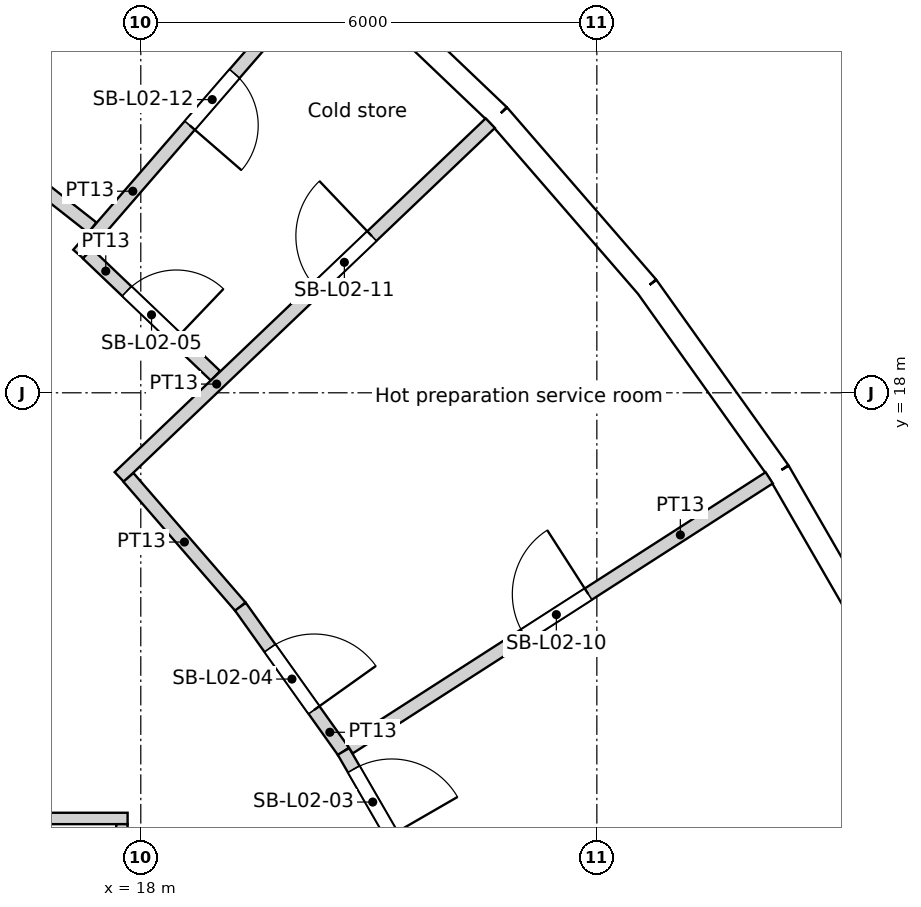
"""IFC4 building model, lengths in metres.
Left out: names, types, materials, properties, quantities, classifications, styles, units other than length and angle.
Written with IfcOpenShell. Run it as: python <this file> out.ifc"""

import sys

from ifc_helpers import new_model, si_unit, direction, frame, frame_2d, origin, origin_2d, place, context, subcontext, project, spatial, rectangle, circle, extrude, element, fill, save


model = new_model("IFC4")
c1 = context("Model", 3, precision=1e-05, world=origin(), true_north=direction((0.0, 1.0)))
c2 = subcontext(c1, "Body", "Model", "MODEL_VIEW")
j1 = project(units=[si_unit("LENGTHUNIT", "METRE"), si_unit("PLANEANGLEUNIT", "RADIAN")], contexts=[c1])
p1 = place(None, origin())
s1 = spatial("IfcSite", under=j1, at=p1, CompositionType="ELEMENT")
p2 = place(p1, origin())
s2 = spatial("IfcBuilding", under=s1, at=p2, CompositionType="ELEMENT")
p3 = place(p2, frame((0.0, 0.0, 13.8)))
s3 = spatial("IfcBuildingStorey", under=s2, at=p3, CompositionType="ELEMENT", Elevation=13.8)
for number, where, z_axis, x_axis in (
    (1, (25.469, 16.368, 0.0), (0.0, 0.0, 1.0), (1.0, 0.0, 0.0)),
    (2, (21.911, 20.892, 0.0), (0.0, 0.0, 1.0), (1.0, 0.0, 0.0)),
):
    element("IfcColumn", number, at=place(p3, frame(where, z_axis=z_axis, x_axis=x_axis)), inside=s3, PredefinedType="COLUMN", context=c2, shape_type="SweptSolid", body=[
        extrude(circle(Radius=0.7, at=origin_2d()), origin(), (0.0, 0.0, 1.0), 4.8),
    ])
p4 = place(p3, frame((18.805, 15.779, 0.0), z_axis=(0.0, 0.0, 1.0), x_axis=(1.0, 0.0, 0.0)))
e3 = element("IfcColumn", 3, at=p4, inside=s3, PredefinedType="COLUMN", context=c2, shape_type="SweptSolid", body=[
    extrude(circle(Radius=0.75, at=origin_2d()), origin(), (0.0, 0.0, 1.0), 4.8),
])
p5 = place(p3, frame((27.887, 14.377, 0.0), z_axis=(0.0, 0.0, 1.0), x_axis=(-0.500017373705, 0.866015372839, 0.0)))
e4 = element("IfcWall", 4, at=p5, inside=s3, PredefinedType="SOLIDWALL", context=c2, shape_type="SweptSolid", body=[
    extrude(rectangle(XDim=2.986, YDim=0.3, at=frame_2d((1.493, 0.0))), origin(), (0.0, 0.0, 1.0), 4.35),
])
p6 = place(p5, frame((1.493, 0.0, 2.0)))
e5 = element("IfcOpeningElement", 5, at=p6, cuts=e4, PredefinedType="OPENING", context=c2, shape_type="SweptSolid", body=[
    extrude(circle(Radius=1.2, at=origin_2d()), frame((0.0, 0.16, 0.0), z_axis=(0.0, -1.0, 0.0), x_axis=(1.0, 0.0, 0.0)), (0.0, 0.0, 1.0), 0.32),
])
p7 = place(p3, frame((26.394, 16.962, 0.0), z_axis=(0.0, 0.0, 1.0), x_axis=(-0.580100533892, 0.814544885551, 0.0)))
e6 = element("IfcWall", 6, at=p7, inside=s3, PredefinedType="SOLIDWALL", context=c2, shape_type="SweptSolid", body=[
    extrude(rectangle(XDim=2.986, YDim=0.3, at=frame_2d((1.493, 0.0))), origin(), (0.0, 0.0, 1.0), 4.35),
])
p8 = place(p7, frame((1.493, 0.0, 2.0)))
e7 = element("IfcOpeningElement", 7, at=p8, cuts=e6, PredefinedType="OPENING", context=c2, shape_type="SweptSolid", body=[
    extrude(circle(Radius=1.2, at=origin_2d()), frame((0.0, 0.16, 0.0), z_axis=(0.0, -1.0, 0.0), x_axis=(1.0, 0.0, 0.0)), (0.0, 0.0, 1.0), 0.32),
])
p9 = place(p3, frame((24.662, 19.394, 0.0), z_axis=(0.0, 0.0, 1.0), x_axis=(-0.654809121128, 0.755794294029, 0.0)))
e8 = element("IfcWall", 8, at=p9, inside=s3, PredefinedType="SOLIDWALL", context=c2, shape_type="SweptSolid", body=[
    extrude(rectangle(XDim=2.986, YDim=0.3, at=frame_2d((1.493, 0.0))), origin(), (0.0, 0.0, 1.0), 4.35),
])
p10 = place(p9, frame((1.493, 0.0, 2.0)))
e9 = element("IfcOpeningElement", 9, at=p10, cuts=e8, PredefinedType="OPENING", context=c2, shape_type="SweptSolid", body=[
    extrude(circle(Radius=1.2, at=origin_2d()), frame((0.0, 0.16, 0.0), z_axis=(0.0, -1.0, 0.0), x_axis=(1.0, 0.0, 0.0)), (0.0, 0.0, 1.0), 0.32),
])
p11 = place(p3, frame((22.707, 21.651, 0.0), z_axis=(0.0, 0.0, 1.0), x_axis=(-0.723750841228, 0.690061388444, 0.0)))
e10 = element("IfcWall", 10, at=p11, inside=s3, PredefinedType="SOLIDWALL", context=c2, shape_type="SweptSolid", body=[
    extrude(rectangle(XDim=2.986, YDim=0.3, at=frame_2d((1.493, 0.0))), origin(), (0.0, 0.0, 1.0), 4.35),
])
p12 = place(p11, frame((1.493, 0.0, 2.0)))
e11 = element("IfcOpeningElement", 11, at=p12, cuts=e10, PredefinedType="OPENING", context=c2, shape_type="SweptSolid", body=[
    extrude(circle(Radius=1.2, at=origin_2d()), frame((0.0, 0.16, 0.0), z_axis=(0.0, -1.0, 0.0), x_axis=(1.0, 0.0, 0.0)), (0.0, 0.0, 1.0), 0.32),
])
p13 = place(p3, frame((17.361, 20.173, 0.0), z_axis=(0.0, 0.0, 1.0), x_axis=(-0.786037421758, 0.618178915522, 0.0)))
e12 = element("IfcWall", 12, at=p13, inside=s3, PredefinedType="PARTITIONING", context=c2, shape_type="SweptSolid", body=[
    extrude(rectangle(XDim=2.443, YDim=0.175, at=frame_2d((1.222, 0.0))), origin(), (0.0, 0.0, 1.0), 3.75),
])
p14 = place(p3, frame((17.752, 8.328, 0.0), z_axis=(0.0, 0.0, 1.0), x_axis=(0.0, 1.0, 0.0)))
e13 = element("IfcWall", 13, at=p14, inside=s3, PredefinedType="PARTITIONING", context=c2, shape_type="SweptSolid", body=[
    extrude(rectangle(XDim=3.997, YDim=0.15, at=frame_2d((1.999, 0.0))), origin(), (0.0, 0.0, 1.0), 3.75),
])
p15 = place(p3, frame((-4.292, 12.4, 0.0), z_axis=(0.0, 0.0, 1.0), x_axis=(1.0, 0.0, 0.0)))
e14 = element("IfcWall", 14, at=p15, inside=s3, PredefinedType="PARTITIONING", context=c2, shape_type="SweptSolid", body=[
    extrude(rectangle(XDim=22.118, YDim=0.15, at=frame_2d((11.059, 0.0))), origin(), (0.0, 0.0, 1.0), 3.75),
])
p16 = place(p15, frame((12.196, 0.0, 0.0)))
e15 = element("IfcOpeningElement", 15, at=p16, cuts=e14, PredefinedType="OPENING", context=c2, shape_type="SweptSolid", body=[
    extrude(rectangle(XDim=1.2, YDim=2.4, at=frame_2d((0.6, 1.2))), frame((0.0, 0.075, 0.0), z_axis=(0.0, -1.0, 0.0), x_axis=(1.0, 0.0, 0.0)), (0.0, 0.0, 1.0), 0.15),
])
p17 = place(p15, frame((2.75, 0.0, 0.0)))
e16 = element("IfcOpeningElement", 16, at=p17, cuts=e14, PredefinedType="OPENING", context=c2, shape_type="SweptSolid", body=[
    extrude(rectangle(XDim=1.8, YDim=2.4, at=frame_2d((0.9, 1.2))), frame((0.0, 0.075, 0.0), z_axis=(0.0, -1.0, 0.0), x_axis=(1.0, 0.0, 0.0)), (0.0, 0.0, 1.0), 0.15),
])
p18 = place(p3, frame((17.298, 19.83, 0.0), z_axis=(0.0, 0.0, 1.0), x_axis=(0.723793587031, -0.69001655297, 0.0)))
e17 = element("IfcWall", 17, at=p18, inside=s3, PredefinedType="PARTITIONING", context=c2, shape_type="SweptSolid", body=[
    extrude(rectangle(XDim=2.327, YDim=0.175, at=frame_2d((1.164, 0.0))), origin(), (0.0, 0.0, 1.0), 3.75),
])
p19 = place(p18, frame((0.715, 0.0, 0.0)))
e18 = element("IfcOpeningElement", 18, at=p19, cuts=e17, PredefinedType="OPENING", context=c2, shape_type="SweptSolid", body=[
    extrude(rectangle(XDim=0.9, YDim=2.1, at=frame_2d((0.45, 1.05))), frame((0.0, 0.087, 0.0), z_axis=(0.0, -1.0, 0.0), x_axis=(1.0, 0.0, 0.0)), (0.0, 0.0, 1.0), 0.175),
])
p20 = place(p3, frame((19.311, 15.186, 0.0), z_axis=(0.0, 0.0, 1.0), x_axis=(-0.654802497225, 0.755800032831, 0.0)))
e19 = element("IfcWall", 19, at=p20, inside=s3, PredefinedType="PARTITIONING", context=c2, shape_type="SweptSolid", body=[
    extrude(rectangle(XDim=2.25, YDim=0.175, at=frame_2d((1.125, 0.0))), origin(), (0.0, 0.0, 1.0), 3.75),
])
p21 = place(p3, frame((17.178, 19.824, 0.0), z_axis=(0.0, 0.0, 1.0), x_axis=(0.654869105533, 0.755742320251, 0.0)))
e20 = element("IfcWall", 20, at=p21, inside=s3, PredefinedType="PARTITIONING", context=c2, shape_type="SweptSolid", body=[
    extrude(rectangle(XDim=4.993, YDim=0.175, at=frame_2d((2.497, 0.0))), origin(), (0.0, 0.0, 1.0), 3.75),
])
p22 = place(p21, frame((2.24, 0.0, 0.0)))
e21 = element("IfcOpeningElement", 21, at=p22, cuts=e20, PredefinedType="OPENING", context=c2, shape_type="SweptSolid", body=[
    extrude(rectangle(XDim=0.9, YDim=2.1, at=frame_2d((0.45, 1.05))), frame((0.0, 0.087, 0.0), z_axis=(0.0, -1.0, 0.0), x_axis=(1.0, 0.0, 0.0)), (0.0, 0.0, 1.0), 0.175),
])
p23 = place(p3, frame((19.311, 15.186, 0.0), z_axis=(0.0, 0.0, 1.0), x_axis=(0.580032319147, -0.814593462252, 0.0)))
e22 = element("IfcWall", 22, at=p23, inside=s3, PredefinedType="PARTITIONING", context=c2, shape_type="SweptSolid", body=[
    extrude(rectangle(XDim=2.338, YDim=0.175, at=frame_2d((1.169, 0.0))), origin(), (0.0, 0.0, 1.0), 3.75),
])
p24 = place(p23, frame((0.669, 0.0, 0.0)))
e23 = element("IfcOpeningElement", 23, at=p24, cuts=e22, PredefinedType="OPENING", context=c2, shape_type="SweptSolid", body=[
    extrude(rectangle(XDim=1.0, YDim=2.1, at=frame_2d((0.5, 1.05))), frame((0.0, 0.087, 0.0), z_axis=(0.0, -1.0, 0.0), x_axis=(1.0, 0.0, 0.0)), (0.0, 0.0, 1.0), 0.175),
])
p25 = place(p3, frame((20.667, 13.282, 0.0), z_axis=(0.0, 0.0, 1.0), x_axis=(0.500002679963, -0.866023856502, 0.0)))
e24 = element("IfcWall", 24, at=p25, inside=s3, PredefinedType="PARTITIONING", context=c2, shape_type="SweptSolid", body=[
    extrude(rectangle(XDim=2.338, YDim=0.175, at=frame_2d((1.169, 0.0))), origin(), (0.0, 0.0, 1.0), 3.75),
])
p26 = place(p25, frame((0.269, 0.0, 0.0)))
e25 = element("IfcOpeningElement", 25, at=p26, cuts=e24, PredefinedType="OPENING", context=c2, shape_type="SweptSolid", body=[
    extrude(rectangle(XDim=1.0, YDim=2.1, at=frame_2d((0.5, 1.05))), frame((0.0, 0.087, 0.0), z_axis=(0.0, -1.0, 0.0), x_axis=(1.0, 0.0, 0.0)), (0.0, 0.0, 1.0), 0.175),
])
p27 = place(p3, frame((17.717, 16.893, 0.0), z_axis=(0.0, 0.0, 1.0), x_axis=(0.723737544967, 0.690075333573, 0.0)))
e26 = element("IfcWall", 26, at=p27, inside=s3, PredefinedType="PARTITIONING", context=c2, shape_type="SweptSolid", body=[
    extrude(rectangle(XDim=6.745, YDim=0.175, at=frame_2d((3.373, 0.0))), origin(), (0.0, 0.0, 1.0), 3.75),
])
p28 = place(p27, frame((3.592, 0.0, 0.0)))
e27 = element("IfcOpeningElement", 27, at=p28, cuts=e26, PredefinedType="OPENING", context=c2, shape_type="SweptSolid", body=[
    extrude(rectangle(XDim=1.0, YDim=2.1, at=frame_2d((0.5, 1.05))), frame((0.0, 0.087, 0.0), z_axis=(0.0, -1.0, 0.0), x_axis=(1.0, 0.0, 0.0)), (0.0, 0.0, 1.0), 0.175),
])
p29 = place(p3, frame((20.74, 13.329, 0.0), z_axis=(0.0, 0.0, 1.0), x_axis=(0.841256944445, 0.540635508844, 0.0)))
e28 = element("IfcWall", 28, at=p29, inside=s3, PredefinedType="PARTITIONING", context=c2, shape_type="SweptSolid", body=[
    extrude(rectangle(XDim=6.57, YDim=0.175, at=frame_2d((3.285, 0.0))), origin(), (0.0, 0.0, 1.0), 3.75),
])
p30 = place(p29, frame((2.741, 0.0, 0.0)))
e29 = element("IfcOpeningElement", 29, at=p30, cuts=e28, PredefinedType="OPENING", context=c2, shape_type="SweptSolid", body=[
    extrude(rectangle(XDim=1.0, YDim=2.1, at=frame_2d((0.5, 1.05))), frame((0.0, 0.087, 0.0), z_axis=(0.0, -1.0, 0.0), x_axis=(1.0, 0.0, 0.0)), (0.0, 0.0, 1.0), 0.175),
])
p31 = place(p6, origin())
e30 = element("IfcWindow", 30, at=p31, inside=s3, PartitioningType="SINGLE_PANEL", PredefinedType="WINDOW", context=c2, shape_type="SweptSolid", body=[
    extrude(circle(Radius=1.2, at=origin_2d()), frame((0.0, 0.12, 0.0), z_axis=(0.0, -1.0, 0.0), x_axis=(1.0, 0.0, 0.0)), (0.0, 0.0, 1.0), 0.1),
])
fill(e5, e30)
p32 = place(p8, origin())
e31 = element("IfcWindow", 31, at=p32, inside=s3, PartitioningType="SINGLE_PANEL", PredefinedType="WINDOW", context=c2, shape_type="SweptSolid", body=[
    extrude(circle(Radius=1.2, at=origin_2d()), frame((0.0, 0.12, 0.0), z_axis=(0.0, -1.0, 0.0), x_axis=(1.0, 0.0, 0.0)), (0.0, 0.0, 1.0), 0.1),
])
fill(e7, e31)
p33 = place(p10, origin())
e32 = element("IfcWindow", 32, at=p33, inside=s3, PartitioningType="SINGLE_PANEL", PredefinedType="WINDOW", context=c2, shape_type="SweptSolid", body=[
    extrude(circle(Radius=1.2, at=origin_2d()), frame((0.0, 0.12, 0.0), z_axis=(0.0, -1.0, 0.0), x_axis=(1.0, 0.0, 0.0)), (0.0, 0.0, 1.0), 0.1),
])
fill(e9, e32)
p34 = place(p12, origin())
e33 = element("IfcWindow", 33, at=p34, inside=s3, PartitioningType="SINGLE_PANEL", PredefinedType="WINDOW", context=c2, shape_type="SweptSolid", body=[
    extrude(circle(Radius=1.2, at=origin_2d()), frame((0.0, 0.12, 0.0), z_axis=(0.0, -1.0, 0.0), x_axis=(1.0, 0.0, 0.0)), (0.0, 0.0, 1.0), 0.1),
])
fill(e11, e33)
p35 = place(p26, origin())
e34 = element("IfcDoor", 34, at=p35, inside=s3, OperationType="SINGLE_SWING_RIGHT", PredefinedType="DOOR", context=c2, shape_type="SweptSolid", body=[
    extrude(rectangle(XDim=1.0, YDim=2.1, at=frame_2d((0.5, 1.05))), frame((0.0, 0.025, 0.0), z_axis=(0.0, -1.0, 0.0), x_axis=(1.0, 0.0, 0.0)), (0.0, 0.0, 1.0), 0.05),
])
fill(e25, e34)
p36 = place(p24, origin())
e35 = element("IfcDoor", 35, at=p36, inside=s3, OperationType="SINGLE_SWING_RIGHT", PredefinedType="DOOR", context=c2, shape_type="SweptSolid", body=[
    extrude(rectangle(XDim=1.0, YDim=2.1, at=frame_2d((0.5, 1.05))), frame((0.0, 0.025, 0.0), z_axis=(0.0, -1.0, 0.0), x_axis=(1.0, 0.0, 0.0)), (0.0, 0.0, 1.0), 0.05),
])
fill(e23, e35)
p37 = place(p19, origin())
e36 = element("IfcDoor", 36, at=p37, inside=s3, OperationType="SINGLE_SWING_RIGHT", PredefinedType="DOOR", context=c2, shape_type="SweptSolid", body=[
    extrude(rectangle(XDim=0.9, YDim=2.1, at=frame_2d((0.45, 1.05))), frame((0.0, 0.025, 0.0), z_axis=(0.0, -1.0, 0.0), x_axis=(1.0, 0.0, 0.0)), (0.0, 0.0, 1.0), 0.05),
])
fill(e18, e36)
p38 = place(p30, origin())
e37 = element("IfcDoor", 37, at=p38, inside=s3, OperationType="SINGLE_SWING_RIGHT", PredefinedType="DOOR", context=c2, shape_type="SweptSolid", body=[
    extrude(rectangle(XDim=1.0, YDim=2.1, at=frame_2d((0.5, 1.05))), frame((0.0, 0.025, 0.0), z_axis=(0.0, -1.0, 0.0), x_axis=(1.0, 0.0, 0.0)), (0.0, 0.0, 1.0), 0.05),
])
fill(e29, e37)
p39 = place(p28, origin())
e38 = element("IfcDoor", 38, at=p39, inside=s3, OperationType="SINGLE_SWING_RIGHT", PredefinedType="DOOR", context=c2, shape_type="SweptSolid", body=[
    extrude(rectangle(XDim=1.0, YDim=2.1, at=frame_2d((0.5, 1.05))), frame((0.0, 0.025, 0.0), z_axis=(0.0, -1.0, 0.0), x_axis=(1.0, 0.0, 0.0)), (0.0, 0.0, 1.0), 0.05),
])
fill(e27, e38)
p40 = place(p22, origin())
e39 = element("IfcDoor", 39, at=p40, inside=s3, OperationType="SINGLE_SWING_RIGHT", PredefinedType="DOOR", context=c2, shape_type="SweptSolid", body=[
    extrude(rectangle(XDim=0.9, YDim=2.1, at=frame_2d((0.45, 1.05))), frame((0.0, 0.025, 0.0), z_axis=(0.0, -1.0, 0.0), x_axis=(1.0, 0.0, 0.0)), (0.0, 0.0, 1.0), 0.05),
])
fill(e21, e39)
save(model, sys.argv[1])
